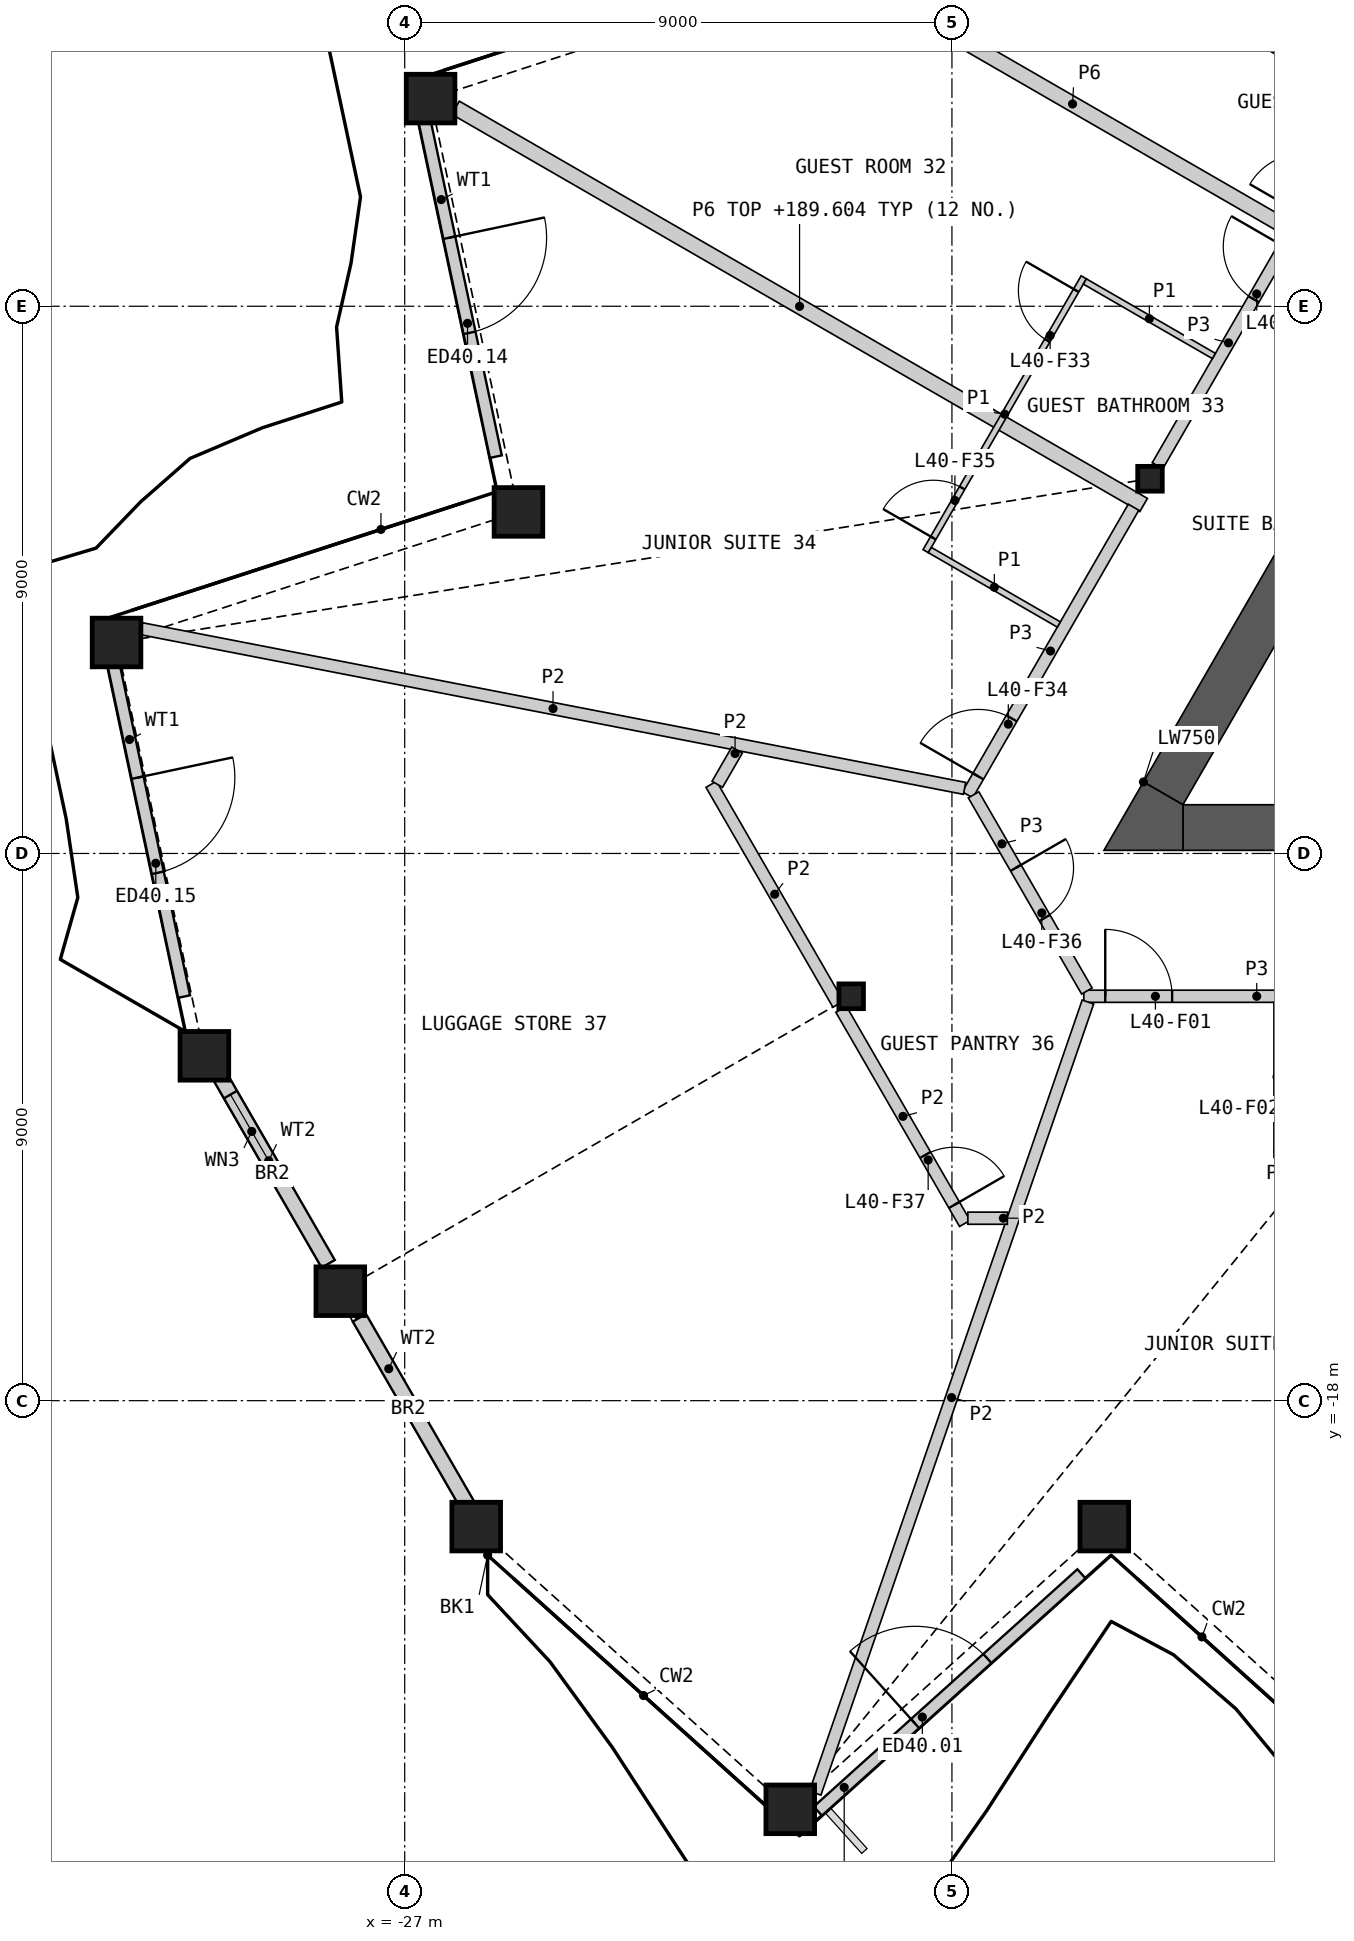
"""IFC4 building model, lengths in metres.
Left out: names, types, materials, properties, quantities, classifications, styles, units other than length and angle.
Written with IfcOpenShell. Run it as: python <this file> out.ifc"""

import sys

from ifc_helpers import new_model, si_unit, direction, frame, frame_2d, origin, origin_2d, place, context, subcontext, project, spatial, polyline, rectangle, hollow_rectangle, i_section, outline, extrude, element, fill, save


model = new_model("IFC4")
c1 = context("Model", 3, precision=1e-05, world=origin(), true_north=direction((0.0, 1.0)))
c2 = subcontext(c1, "Body", "Model", "MODEL_VIEW")
j1 = project(units=[si_unit("LENGTHUNIT", "METRE"), si_unit("PLANEANGLEUNIT", "RADIAN")], contexts=[c1])
p1 = place(None, origin())
s1 = spatial("IfcSite", under=j1, at=p1, CompositionType="ELEMENT")
p2 = place(p1, origin())
s2 = spatial("IfcBuilding", under=s1, at=p2, CompositionType="ELEMENT")
p3 = place(p2, frame((0.0, 0.0, 187.2)))
s3 = spatial("IfcBuildingStorey", under=s2, at=p3, CompositionType="ELEMENT", Elevation=187.2)
for number, where, z_axis, x_axis in (
    (1, (-25.823, -20.071, 0.0), (0.0, 0.0, 1.0), (1.0, 0.0, 0.0)),
    (2, (-20.659, -24.722, 0.0), (0.0, 0.0, 1.0), (1.0, 0.0, 0.0)),
    (3, (-15.494, -20.071, 0.0), (0.0, 0.0, 1.0), (1.0, 0.0, 0.0)),
    (4, (-26.574, 3.415, 0.0), (0.0, 0.0, 1.0), (1.0, 0.0, 0.0)),
    (5, (-25.129, -3.383, 0.0), (0.0, 0.0, 1.0), (1.0, 0.0, 0.0)),
    (6, (-31.739, -5.53, 0.0), (0.0, 0.0, 1.0), (1.0, 0.0, 0.0)),
    (7, (-30.294, -12.328, 0.0), (0.0, 0.0, 1.0), (1.0, 0.0, 0.0)),
    (8, (-28.059, -16.2, 0.0), (0.0, 0.0, 1.0), (1.0, 0.0, 0.0)),
):
    element("IfcColumn", number, at=place(p3, frame(where, z_axis=z_axis, x_axis=x_axis)), inside=s3, PredefinedType="COLUMN", context=c2, shape_type="SweptSolid", body=[
        extrude(hollow_rectangle(XDim=0.8, YDim=0.8, WallThickness=0.05, at=origin_2d()), origin(), (0.0, 0.0, 1.0), 3.6),
    ])
for number, where, z_axis, x_axis in (
    (9, (-14.743, -2.837, 0.0), (0.0, 0.0, 1.0), (1.0, 0.0, 0.0)),
    (10, (-19.657, -11.349, 0.0), (0.0, 0.0, 1.0), (1.0, 0.0, 0.0)),
):
    element("IfcColumn", number, at=place(p3, frame(where, z_axis=z_axis, x_axis=x_axis)), inside=s3, PredefinedType="COLUMN", context=c2, shape_type="SweptSolid", body=[
        extrude(i_section(OverallWidth=0.404, OverallDepth=0.407, WebThickness=0.027, FlangeThickness=0.044, at=origin_2d()), origin(), (0.0, 0.0, 1.0), 3.6),
    ])
p4 = place(p3, frame((-20.205, -24.751, 0.0), z_axis=(0.0, 0.0, 1.0), x_axis=(0.743135964011, 0.669140447883, 0.0)))
e11 = element("IfcWall", 11, at=p4, inside=s3, PredefinedType="SOLIDWALL", context=c2, shape_type="SweptSolid", body=[
    extrude(rectangle(XDim=5.833, YDim=0.2, at=frame_2d((2.917, 0.0))), origin(), (0.0, 0.0, 1.0), 2.701),
])
p5 = place(p4, frame((2.152, 0.0, 0.0)))
e12 = element("IfcOpeningElement", 12, at=p5, cuts=e11, PredefinedType="OPENING", context=c2, shape_type="SweptSolid", body=[
    extrude(rectangle(XDim=1.6, YDim=2.4, at=frame_2d((0.8, 1.2))), frame((0.0, 0.11, 0.0), z_axis=(0.0, -1.0, 0.0), x_axis=(1.0, 0.0, 0.0)), (0.0, 0.0, 1.0), 0.22),
])
p6 = place(p3, frame((-26.699, 3.164, 0.0), z_axis=(0.0, 0.0, 1.0), x_axis=(0.207914487103, -0.978147006361, 0.0)))
e13 = element("IfcWall", 13, at=p6, inside=s3, PredefinedType="SOLIDWALL", context=c2, shape_type="SweptSolid", body=[
    extrude(rectangle(XDim=5.763, YDim=0.2, at=frame_2d((2.882, 0.0))), origin(), (0.0, 0.0, 1.0), 2.701),
])
p7 = place(p6, frame((2.082, 0.0, 0.0)))
e14 = element("IfcOpeningElement", 14, at=p7, cuts=e13, PredefinedType="OPENING", context=c2, shape_type="SweptSolid", body=[
    extrude(rectangle(XDim=1.6, YDim=2.4, at=frame_2d((0.8, 1.2))), frame((0.0, 0.11, 0.0), z_axis=(0.0, -1.0, 0.0), x_axis=(1.0, 0.0, 0.0)), (0.0, 0.0, 1.0), 0.22),
])
p8 = place(p3, frame((-31.826, -5.717, 0.0), z_axis=(0.0, 0.0, 1.0), x_axis=(0.207914487103, -0.978147006361, 0.0)))
e15 = element("IfcWall", 15, at=p8, inside=s3, PredefinedType="SOLIDWALL", context=c2, shape_type="SweptSolid", body=[
    extrude(rectangle(XDim=5.763, YDim=0.2, at=frame_2d((2.882, 0.0))), origin(), (0.0, 0.0, 1.0), 2.701),
])
p9 = place(p8, frame((2.082, 0.0, 0.0)))
e16 = element("IfcOpeningElement", 16, at=p9, cuts=e15, PredefinedType="OPENING", context=c2, shape_type="SweptSolid", body=[
    extrude(rectangle(XDim=1.6, YDim=2.4, at=frame_2d((0.8, 1.2))), frame((0.0, 0.11, 0.0), z_axis=(0.0, -1.0, 0.0), x_axis=(1.0, 0.0, 0.0)), (0.0, 0.0, 1.0), 0.22),
])
p10 = place(p3, frame((-30.215, -12.36, 0.0), z_axis=(0.0, 0.0, 1.0), x_axis=(0.499995984904, -0.866027721889, 0.0)))
e17 = element("IfcWall", 17, at=p10, inside=s3, PredefinedType="SOLIDWALL", context=c2, shape_type="SweptSolid", body=[
    extrude(rectangle(XDim=3.915, YDim=0.25, at=frame_2d((1.957, 0.0))), origin(), (0.0, 0.0, 1.0), 2.701),
])
p11 = place(p10, frame((0.7, 0.0, 1.7)))
e18 = element("IfcOpeningElement", 18, at=p11, cuts=e17, PredefinedType="OPENING", context=c2, shape_type="SweptSolid", body=[
    extrude(rectangle(XDim=1.4, YDim=0.8, at=frame_2d((0.7, 0.4))), frame((0.0, 0.135, 0.0), z_axis=(0.0, -1.0, 0.0), x_axis=(1.0, 0.0, 0.0)), (0.0, 0.0, 1.0), 0.27),
])
p12 = place(p3, frame((-27.745, -16.637, 0.0), z_axis=(0.0, 0.0, 1.0), x_axis=(0.499981047344, -0.866036345829, 0.0)))
e19 = element("IfcWall", 19, at=p12, inside=s3, PredefinedType="SOLIDWALL", context=c2, shape_type="SweptSolid", body=[
    extrude(rectangle(XDim=3.868, YDim=0.25, at=frame_2d((1.934, 0.0))), origin(), (0.0, 0.0, 1.0), 2.701),
])
p13 = place(p3, frame((-14.201, -8.574, 0.0), z_axis=(0.0, 0.0, 1.0), x_axis=(1.0, 0.0, 0.0)))
e20 = element("IfcWall", 20, at=p13, inside=s3, PredefinedType="SHEAR", context=c2, shape_type="SweptSolid", body=[
    extrude(rectangle(XDim=3.676, YDim=0.75, at=frame_2d((1.838, 0.0))), origin(), (0.0, 0.0, 1.0), 3.25),
])
p14 = place(p3, frame((-9.625, 0.477, 0.0), z_axis=(0.0, 0.0, 1.0), x_axis=(-0.499986234705, -0.866033351035, 0.0)))
e21 = element("IfcWall", 21, at=p14, inside=s3, PredefinedType="SHEAR", context=c2, shape_type="SweptSolid", body=[
    extrude(rectangle(XDim=9.801, YDim=0.75, at=frame_2d((4.9, 0.0))), origin(), (0.0, 0.0, 1.0), 3.25),
])
p15 = place(p3, origin())
e22 = element("IfcWall", 22, at=p15, inside=s3, PredefinedType="SHEAR", context=c2, shape_type="SweptSolid", body=[
    extrude(outline(polyline([(-14.851, -7.824), (-14.201, -8.199), (-14.201, -8.949), (-15.5, -8.949), (-14.851, -7.824)])), origin(), (0.0, 0.0, 1.0), 3.25),
])
p16 = place(p3, frame((-26.164, 3.265, 0.0), z_axis=(0.0, 0.0, 1.0), x_axis=(0.866021313335, -0.500007084799, 0.0)))
e23 = element("IfcWall", 23, at=p16, inside=s3, PredefinedType="PARTITIONING", context=c2, shape_type="SweptSolid", body=[
    extrude(rectangle(XDim=13.068, YDim=0.25, at=frame_2d((6.534, 0.0))), origin(), (0.0, 0.0, 1.0), 2.404),
])
p17 = place(p3, frame((-14.619, -2.624, 0.0), z_axis=(0.0, 0.0, 1.0), x_axis=(0.50000393355, 0.866023132736, 0.0)))
e24 = element("IfcWall", 24, at=p17, inside=s3, PredefinedType="PARTITIONING", context=c2, shape_type="SweptSolid", body=[
    extrude(rectangle(XDim=9.335, YDim=0.2, at=frame_2d((4.667, 0.0))), origin(), (0.0, 0.0, 1.0), 3.25),
])
p18 = place(p17, frame((4.77, 0.0, 0.0)))
e25 = element("IfcOpeningElement", 25, at=p18, cuts=e24, PredefinedType="OPENING", context=c2, shape_type="SweptSolid", body=[
    extrude(rectangle(XDim=1.0, YDim=2.1, at=frame_2d((0.5, 1.05))), frame((0.0, 0.11, 0.0), z_axis=(0.0, -1.0, 0.0), x_axis=(1.0, 0.0, 0.0)), (0.0, 0.0, 1.0), 0.22),
])
p19 = place(p17, frame((3.163, 0.0, 0.0)))
e26 = element("IfcOpeningElement", 26, at=p19, cuts=e24, PredefinedType="OPENING", context=c2, shape_type="SweptSolid", body=[
    extrude(rectangle(XDim=1.0, YDim=2.1, at=frame_2d((0.5, 1.05))), frame((0.0, 0.11, 0.0), z_axis=(0.0, -1.0, 0.0), x_axis=(1.0, 0.0, 0.0)), (0.0, 0.0, 1.0), 0.22),
])
p20 = place(p3, frame((-19.555, 5.37, 0.0), z_axis=(0.0, 0.0, 1.0), x_axis=(0.866024371346, -0.500001788232, 0.0)))
e27 = element("IfcWall", 27, at=p20, inside=s3, PredefinedType="PARTITIONING", context=c2, shape_type="SweptSolid", body=[
    extrude(rectangle(XDim=8.171, YDim=0.25, at=frame_2d((4.085, 0.0))), origin(), (0.0, 0.0, 1.0), 2.404),
])
p21 = place(p3, frame((-15.831, -11.349, 0.0), z_axis=(0.0, 0.0, 1.0), x_axis=(1.0, 0.0, 0.0)))
e28 = element("IfcWall", 28, at=p21, inside=s3, PredefinedType="PARTITIONING", context=c2, shape_type="SweptSolid", body=[
    extrude(rectangle(XDim=5.687, YDim=0.2, at=frame_2d((2.843, 0.0))), origin(), (0.0, 0.0, 1.0), 3.25),
])
p22 = place(p21, frame((0.352, 0.0, 0.0)))
e29 = element("IfcOpeningElement", 29, at=p22, cuts=e28, PredefinedType="OPENING", context=c2, shape_type="SweptSolid", body=[
    extrude(rectangle(XDim=1.1, YDim=2.1, at=frame_2d((0.55, 1.05))), frame((0.0, 0.11, 0.0), z_axis=(0.0, -1.0, 0.0), x_axis=(1.0, 0.0, 0.0)), (0.0, 0.0, 1.0), 0.22),
])
p23 = place(p3, frame((-17.744, -8.035, 0.0), z_axis=(0.0, 0.0, 1.0), x_axis=(0.49998041698, 0.866036709751, 0.0)))
e30 = element("IfcWall", 30, at=p23, inside=s3, PredefinedType="PARTITIONING", context=c2, shape_type="SweptSolid", body=[
    extrude(rectangle(XDim=5.462, YDim=0.2, at=frame_2d((2.731, 0.0))), origin(), (0.0, 0.0, 1.0), 3.25),
])
p24 = place(p23, frame((0.352, 0.0, 0.0)))
e31 = element("IfcOpeningElement", 31, at=p24, cuts=e30, PredefinedType="OPENING", context=c2, shape_type="SweptSolid", body=[
    extrude(rectangle(XDim=1.1, YDim=2.1, at=frame_2d((0.55, 1.05))), frame((0.0, 0.11, 0.0), z_axis=(0.0, -1.0, 0.0), x_axis=(1.0, 0.0, 0.0)), (0.0, 0.0, 1.0), 0.22),
])
p25 = place(p3, frame((-17.644, -8.035, 0.0), z_axis=(0.0, 0.0, 1.0), x_axis=(0.499958791762, -0.866049194065, 0.0)))
e32 = element("IfcWall", 32, at=p25, inside=s3, PredefinedType="PARTITIONING", context=c2, shape_type="SweptSolid", body=[
    extrude(rectangle(XDim=3.726, YDim=0.2, at=frame_2d((1.863, 0.0))), origin(), (0.0, 0.0, 1.0), 3.25),
])
p26 = place(p25, frame((1.388, 0.0, 0.0)))
e33 = element("IfcOpeningElement", 33, at=p26, cuts=e32, PredefinedType="OPENING", context=c2, shape_type="SweptSolid", body=[
    extrude(rectangle(XDim=0.95, YDim=2.1, at=frame_2d((0.475, 1.05))), frame((0.0, 0.11, 0.0), z_axis=(0.0, -1.0, 0.0), x_axis=(1.0, 0.0, 0.0)), (0.0, 0.0, 1.0), 0.22),
])
p27 = place(p3, frame((-31.329, -5.303, 0.0), z_axis=(0.0, 0.0, 1.0), x_axis=(0.981696755608, -0.190450728612, 0.0)))
e34 = element("IfcWall", 34, at=p27, inside=s3, PredefinedType="PARTITIONING", context=c2, shape_type="SweptSolid", body=[
    extrude(rectangle(XDim=13.79, YDim=0.2, at=frame_2d((6.895, 0.0))), origin(), (0.0, 0.0, 1.0), 2.404),
])
p28 = place(p3, frame((-20.249, -24.455, 0.0), z_axis=(0.0, 0.0, 1.0), x_axis=(0.325902118519, 0.945403516571, 0.0)))
e35 = element("IfcWall", 35, at=p28, inside=s3, PredefinedType="PARTITIONING", context=c2, shape_type="SweptSolid", body=[
    extrude(rectangle(XDim=13.763, YDim=0.2, at=frame_2d((6.881, 0.0))), origin(), (0.0, 0.0, 1.0), 2.404),
])
p29 = place(p3, frame((-21.958, -7.862, 0.0), z_axis=(0.0, 0.0, 1.0), x_axis=(0.499987304225, -0.866032733569, 0.0)))
e36 = element("IfcWall", 36, at=p29, inside=s3, PredefinedType="PARTITIONING", context=c2, shape_type="SweptSolid", body=[
    extrude(rectangle(XDim=4.176, YDim=0.2, at=frame_2d((2.088, 0.0))), origin(), (0.0, 0.0, 1.0), 2.404),
])
p30 = place(p3, frame((-19.822, -11.562, 0.0), z_axis=(0.0, 0.0, 1.0), x_axis=(0.499992600721, -0.866029675718, 0.0)))
e37 = element("IfcWall", 37, at=p30, inside=s3, PredefinedType="PARTITIONING", context=c2, shape_type="SweptSolid", body=[
    extrude(rectangle(XDim=4.068, YDim=0.2, at=frame_2d((2.034, 0.0))), origin(), (0.0, 0.0, 1.0), 2.404),
])
p31 = place(p30, frame((2.767, 0.0, 0.0)))
e38 = element("IfcOpeningElement", 38, at=p31, cuts=e37, PredefinedType="OPENING", context=c2, shape_type="SweptSolid", body=[
    extrude(rectangle(XDim=0.95, YDim=2.1, at=frame_2d((0.475, 1.05))), frame((0.0, 0.11, 0.0), z_axis=(0.0, -1.0, 0.0), x_axis=(1.0, 0.0, 0.0)), (0.0, 0.0, 1.0), 0.22),
])
for number, where, z_axis, x_axis in (
    (39, (-21.859, -7.862, 0.0), (0.0, 0.0, 1.0), (0.5, 0.866, 0.0)),
    (40, (-17.738, -14.999, 0.0), (0.0, 0.0, 1.0), (1.0, 0.0, 0.0)),
):
    element("IfcWall", number, at=place(p3, frame(where, z_axis=z_axis, x_axis=x_axis)), inside=s3, PredefinedType="PARTITIONING", context=c2, shape_type="SweptSolid", body=[
        extrude(rectangle(XDim=0.649, YDim=0.2, at=frame_2d((0.325, 0.0))), origin(), (0.0, 0.0, 1.0), 2.404),
    ])
p32 = place(p3, frame((-18.432, -4.028, 0.0), z_axis=(0.0, 0.0, 1.0), x_axis=(0.499992051641, 0.866029992723, 0.0)))
e41 = element("IfcWall", 41, at=p32, inside=s3, PredefinedType="PARTITIONING", context=c2, shape_type="SweptSolid", body=[
    extrude(rectangle(XDim=5.2, YDim=0.1, at=frame_2d((2.6, 0.0))), origin(), (0.0, 0.0, 1.0), 2.404),
])
p33 = place(p32, frame((4.0, 0.0, 0.0)))
e42 = element("IfcOpeningElement", 42, at=p33, cuts=e41, PredefinedType="OPENING", context=c2, shape_type="SweptSolid", body=[
    extrude(rectangle(XDim=0.95, YDim=2.1, at=frame_2d((0.475, 1.05))), frame((0.0, 0.06, 0.0), z_axis=(0.0, -1.0, 0.0), x_axis=(1.0, 0.0, 0.0)), (0.0, 0.0, 1.0), 0.12),
])
p34 = place(p32, frame((0.25, 0.0, 0.0)))
e43 = element("IfcOpeningElement", 43, at=p34, cuts=e41, PredefinedType="OPENING", context=c2, shape_type="SweptSolid", body=[
    extrude(rectangle(XDim=0.95, YDim=2.1, at=frame_2d((0.475, 1.05))), frame((0.0, 0.06, 0.0), z_axis=(0.0, -1.0, 0.0), x_axis=(1.0, 0.0, 0.0)), (0.0, 0.0, 1.0), 0.12),
])
p35 = place(p3, frame((-13.387, 4.611, 0.0), z_axis=(0.0, 0.0, 1.0), x_axis=(0.866032905446, -0.499987006516, 0.0)))
e44 = element("IfcWall", 44, at=p35, inside=s3, PredefinedType="PARTITIONING", context=c2, shape_type="SweptSolid", body=[
    extrude(rectangle(XDim=2.45, YDim=0.1, at=frame_2d((1.225, 0.0))), origin(), (0.0, 0.0, 1.0), 2.404),
])
for number, where, z_axis, x_axis in (
    (45, (-15.814, 0.407, 0.0), (0.0, 0.0, 1.0), (0.866, -0.5, 0.0)),
    (46, (-18.364, -4.01, 0.0), (0.0, 0.0, 1.0), (0.866, -0.5, 0.0)),
):
    element("IfcWall", number, at=place(p3, frame(where, z_axis=z_axis, x_axis=x_axis)), inside=s3, PredefinedType="PARTITIONING", context=c2, shape_type="SweptSolid", body=[
        extrude(rectangle(XDim=2.45, YDim=0.1, at=frame_2d((1.225, 0.0))), origin(), (0.0, 0.0, 1.0), 2.404),
    ])
p36 = place(p5, origin())
e47 = element("IfcDoor", 47, at=p36, inside=s3, OperationType="DOUBLE_DOOR_SINGLE_SWING", PredefinedType="DOOR", context=c2, shape_type="SweptSolid", body=[
    extrude(rectangle(XDim=1.6, YDim=2.4, at=frame_2d((0.8, 1.2))), frame((0.0, 0.025, 0.0), z_axis=(0.0, -1.0, 0.0), x_axis=(1.0, 0.0, 0.0)), (0.0, 0.0, 1.0), 0.05),
])
fill(e12, e47)
p37 = place(p7, origin())
e48 = element("IfcDoor", 48, at=p37, inside=s3, OperationType="DOUBLE_DOOR_SINGLE_SWING", PredefinedType="DOOR", context=c2, shape_type="SweptSolid", body=[
    extrude(rectangle(XDim=1.6, YDim=2.4, at=frame_2d((0.8, 1.2))), frame((0.0, 0.025, 0.0), z_axis=(0.0, -1.0, 0.0), x_axis=(1.0, 0.0, 0.0)), (0.0, 0.0, 1.0), 0.05),
])
fill(e14, e48)
p38 = place(p9, origin())
e49 = element("IfcDoor", 49, at=p38, inside=s3, OperationType="DOUBLE_DOOR_SINGLE_SWING", PredefinedType="DOOR", context=c2, shape_type="SweptSolid", body=[
    extrude(rectangle(XDim=1.6, YDim=2.4, at=frame_2d((0.8, 1.2))), frame((0.0, 0.025, 0.0), z_axis=(0.0, -1.0, 0.0), x_axis=(1.0, 0.0, 0.0)), (0.0, 0.0, 1.0), 0.05),
])
fill(e16, e49)
p39 = place(p11, origin())
e50 = element("IfcWindow", 50, at=p39, inside=s3, PartitioningType="SINGLE_PANEL", PredefinedType="WINDOW", context=c2, shape_type="SweptSolid", body=[
    extrude(rectangle(XDim=1.4, YDim=0.8, at=frame_2d((0.7, 0.4))), frame((0.0, 0.03, 0.0), z_axis=(0.0, -1.0, 0.0), x_axis=(1.0, 0.0, 0.0)), (0.0, 0.0, 1.0), 0.06),
])
fill(e18, e50)
p40 = place(p22, origin())
e51 = element("IfcDoor", 51, at=p40, inside=s3, OperationType="SINGLE_SWING_LEFT", PredefinedType="DOOR", context=c2, shape_type="SweptSolid", body=[
    extrude(rectangle(XDim=1.1, YDim=2.1, at=frame_2d((0.55, 1.05))), frame((0.0, 0.025, 0.0), z_axis=(0.0, -1.0, 0.0), x_axis=(1.0, 0.0, 0.0)), (0.0, 0.0, 1.0), 0.05),
])
fill(e29, e51)
p41 = place(p19, origin())
e52 = element("IfcDoor", 52, at=p41, inside=s3, OperationType="SINGLE_SWING_RIGHT", PredefinedType="DOOR", context=c2, shape_type="SweptSolid", body=[
    extrude(rectangle(XDim=1.0, YDim=2.1, at=frame_2d((0.5, 1.05))), frame((0.0, 0.025, 0.0), z_axis=(0.0, -1.0, 0.0), x_axis=(1.0, 0.0, 0.0)), (0.0, 0.0, 1.0), 0.05),
])
fill(e26, e52)
p42 = place(p33, origin())
e53 = element("IfcDoor", 53, at=p42, inside=s3, OperationType="SINGLE_SWING_RIGHT", PredefinedType="DOOR", context=c2, shape_type="SweptSolid", body=[
    extrude(rectangle(XDim=0.95, YDim=2.1, at=frame_2d((0.475, 1.05))), frame((0.0, 0.025, 0.0), z_axis=(0.0, -1.0, 0.0), x_axis=(1.0, 0.0, 0.0)), (0.0, 0.0, 1.0), 0.05),
])
fill(e42, e53)
p43 = place(p24, origin())
e54 = element("IfcDoor", 54, at=p43, inside=s3, OperationType="SINGLE_SWING_LEFT", PredefinedType="DOOR", context=c2, shape_type="SweptSolid", body=[
    extrude(rectangle(XDim=1.1, YDim=2.1, at=frame_2d((0.55, 1.05))), frame((0.0, 0.025, 0.0), z_axis=(0.0, -1.0, 0.0), x_axis=(1.0, 0.0, 0.0)), (0.0, 0.0, 1.0), 0.05),
])
fill(e31, e54)
p44 = place(p34, origin())
e55 = element("IfcDoor", 55, at=p44, inside=s3, OperationType="SINGLE_SWING_LEFT", PredefinedType="DOOR", context=c2, shape_type="SweptSolid", body=[
    extrude(rectangle(XDim=0.95, YDim=2.1, at=frame_2d((0.475, 1.05))), frame((0.0, 0.025, 0.0), z_axis=(0.0, -1.0, 0.0), x_axis=(1.0, 0.0, 0.0)), (0.0, 0.0, 1.0), 0.05),
])
fill(e43, e55)
p45 = place(p26, origin())
e56 = element("IfcDoor", 56, at=p45, inside=s3, OperationType="SINGLE_SWING_LEFT", PredefinedType="DOOR", context=c2, shape_type="SweptSolid", body=[
    extrude(rectangle(XDim=0.95, YDim=2.1, at=frame_2d((0.475, 1.05))), frame((0.0, 0.025, 0.0), z_axis=(0.0, -1.0, 0.0), x_axis=(1.0, 0.0, 0.0)), (0.0, 0.0, 1.0), 0.05),
])
fill(e33, e56)
p46 = place(p31, origin())
e57 = element("IfcDoor", 57, at=p46, inside=s3, OperationType="SINGLE_SWING_RIGHT", PredefinedType="DOOR", context=c2, shape_type="SweptSolid", body=[
    extrude(rectangle(XDim=0.95, YDim=2.1, at=frame_2d((0.475, 1.05))), frame((0.0, 0.025, 0.0), z_axis=(0.0, -1.0, 0.0), x_axis=(1.0, 0.0, 0.0)), (0.0, 0.0, 1.0), 0.05),
])
fill(e38, e57)
save(model, sys.argv[1])
